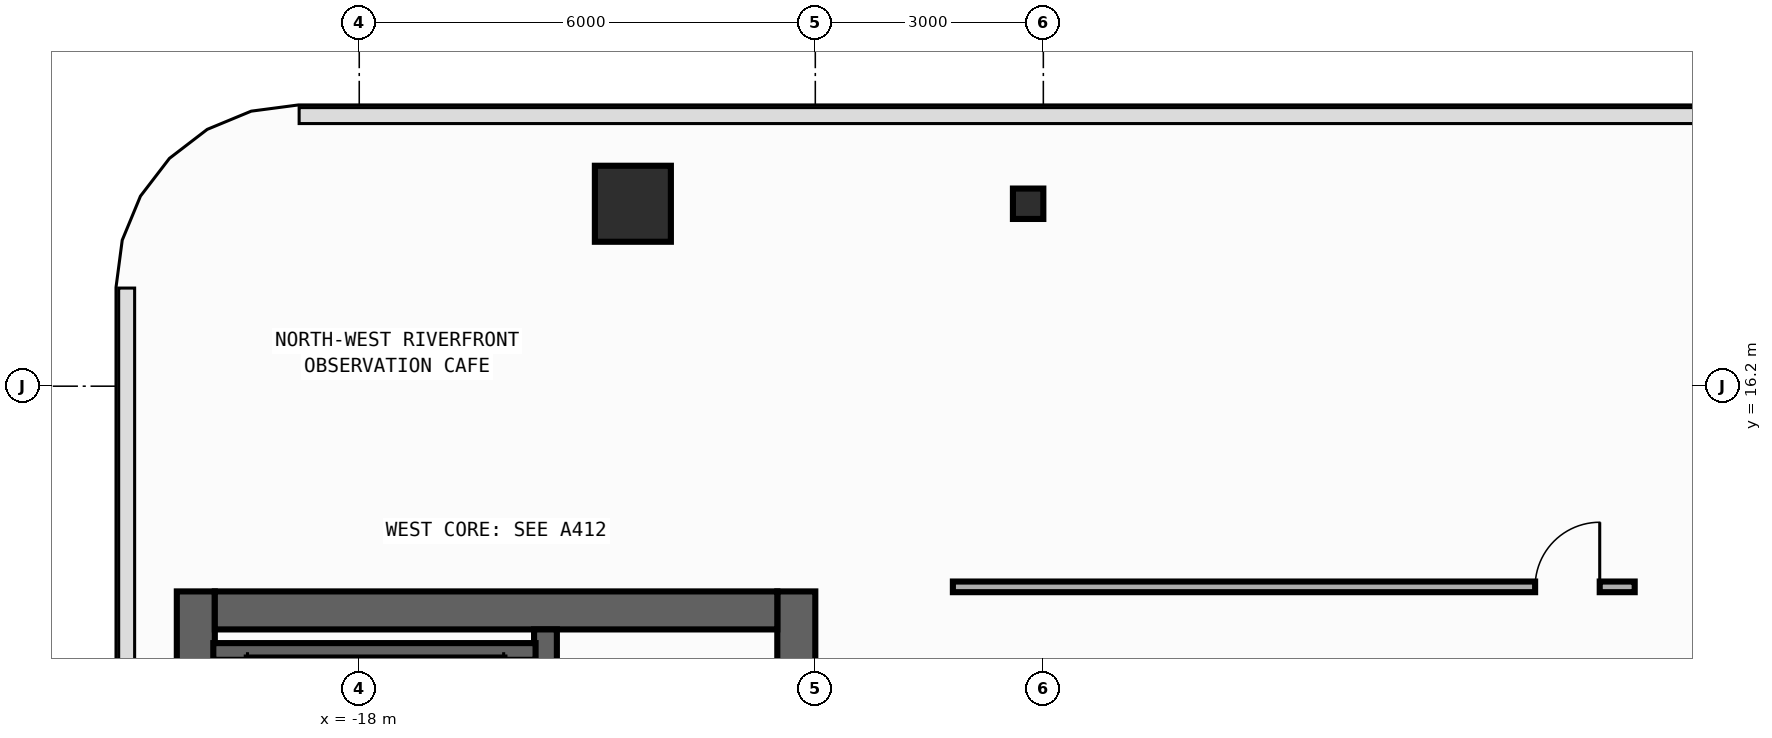
"""IFC4 building model, lengths in metres.
Left out: names, types, materials, properties, quantities, classifications, styles, units other than length and angle.
Written with IfcOpenShell. Run it as: python <this file> out.ifc"""

import sys

from ifc_helpers import new_model, si_unit, direction, frame, frame_2d, origin, origin_2d, place, context, subcontext, project, spatial, rectangle, circle, i_section, extrude, element, fill, save


model = new_model("IFC4")
c1 = context("Model", 3, precision=1e-05, world=origin(), true_north=direction((0.0, 1.0)))
c2 = subcontext(c1, "Body", "Model", "MODEL_VIEW")
j1 = project(units=[si_unit("LENGTHUNIT", "METRE"), si_unit("PLANEANGLEUNIT", "RADIAN")], contexts=[c1])
p1 = place(None, origin())
s1 = spatial("IfcSite", under=j1, at=p1, CompositionType="ELEMENT")
p2 = place(p1, origin())
s2 = spatial("IfcBuilding", under=s1, at=p2, CompositionType="ELEMENT")
p3 = place(p2, frame((0.0, 0.0, 320.4)))
s3 = spatial("IfcBuildingStorey", under=s2, at=p3, CompositionType="ELEMENT", Elevation=320.4)
p4 = place(p3, frame((-20.15, -13.5, 0.0), z_axis=(0.0, 0.0, 1.0), x_axis=(0.0, 1.0, 0.0)))
e1 = element("IfcWall", 1, at=p4, inside=s3, PredefinedType="SHEAR", context=c2, shape_type="SweptSolid", body=[
    extrude(rectangle(XDim=27.0, YDim=0.5, at=frame_2d((13.5, 0.0))), origin(), (0.0, 0.0, 1.0), 4.45),
])
p5 = place(p3, frame((-12.25, -13.5, 0.0), z_axis=(0.0, 0.0, 1.0), x_axis=(0.0, 1.0, 0.0)))
e2 = element("IfcWall", 2, at=p5, inside=s3, PredefinedType="SHEAR", context=c2, shape_type="SweptSolid", body=[
    extrude(rectangle(XDim=27.0, YDim=0.5, at=frame_2d((13.5, 0.0))), origin(), (0.0, 0.0, 1.0), 4.45),
])
p6 = place(p5, frame((15.175, 0.0, 0.0)))
e3 = element("IfcOpeningElement", 3, at=p6, cuts=e2, PredefinedType="OPENING", context=c2, shape_type="SweptSolid", body=[
    extrude(rectangle(XDim=0.85, YDim=2.1, at=frame_2d((0.425, 1.05))), frame((0.0, 0.26, 0.0), z_axis=(0.0, -1.0, 0.0), x_axis=(1.0, 0.0, 0.0)), (0.0, 0.0, 1.0), 0.52),
])
p7 = place(p5, frame((21.275, 0.0, 0.0)))
e4 = element("IfcOpeningElement", 4, at=p7, cuts=e2, PredefinedType="OPENING", context=c2, shape_type="SweptSolid", body=[
    extrude(rectangle(XDim=0.85, YDim=2.1, at=frame_2d((0.425, 1.05))), frame((0.0, 0.26, 0.0), z_axis=(0.0, -1.0, 0.0), x_axis=(1.0, 0.0, 0.0)), (0.0, 0.0, 1.0), 0.52),
])
p8 = place(p5, frame((4.275, 0.0, 0.0)))
e5 = element("IfcOpeningElement", 5, at=p8, cuts=e2, PredefinedType="OPENING", context=c2, shape_type="SweptSolid", body=[
    extrude(rectangle(XDim=0.85, YDim=2.1, at=frame_2d((0.425, 1.05))), frame((0.0, 0.26, 0.0), z_axis=(0.0, -1.0, 0.0), x_axis=(1.0, 0.0, 0.0)), (0.0, 0.0, 1.0), 0.52),
])
p9 = place(p5, frame((10.275, 0.0, 0.0)))
e6 = element("IfcOpeningElement", 6, at=p9, cuts=e2, PredefinedType="OPENING", context=c2, shape_type="SweptSolid", body=[
    extrude(rectangle(XDim=0.85, YDim=2.1, at=frame_2d((0.425, 1.05))), frame((0.0, 0.26, 0.0), z_axis=(0.0, -1.0, 0.0), x_axis=(1.0, 0.0, 0.0)), (0.0, 0.0, 1.0), 0.52),
])
p10 = place(p5, frame((12.725, 0.0, 0.0)))
e7 = element("IfcOpeningElement", 7, at=p10, cuts=e2, PredefinedType="OPENING", context=c2, shape_type="SweptSolid", body=[
    extrude(rectangle(XDim=1.15, YDim=2.2, at=frame_2d((0.575, 1.1))), frame((0.0, 0.26, 0.0), z_axis=(0.0, -1.0, 0.0), x_axis=(1.0, 0.0, 0.0)), (0.0, 0.0, 1.0), 0.52),
])
p11 = place(p5, frame((1.625, 0.0, 0.0)))
e8 = element("IfcOpeningElement", 8, at=p11, cuts=e2, PredefinedType="OPENING", context=c2, shape_type="SweptSolid", body=[
    extrude(rectangle(XDim=0.85, YDim=2.1, at=frame_2d((0.425, 1.05))), frame((0.0, 0.26, 0.0), z_axis=(0.0, -1.0, 0.0), x_axis=(1.0, 0.0, 0.0)), (0.0, 0.0, 1.0), 0.52),
])
p12 = place(p3, frame((-19.9, 13.25, 0.0), z_axis=(0.0, 0.0, 1.0), x_axis=(1.0, 0.0, 0.0)))
e9 = element("IfcWall", 9, at=p12, inside=s3, PredefinedType="SHEAR", context=c2, shape_type="SweptSolid", body=[
    extrude(rectangle(XDim=7.4, YDim=0.5, at=frame_2d((3.7, 0.0))), origin(), (0.0, 0.0, 1.0), 4.45),
])
p13 = place(p3, frame((-15.55, -13.0, 0.0), z_axis=(0.0, 0.0, 1.0), x_axis=(0.0, 1.0, 0.0)))
e10 = element("IfcWall", 10, at=p13, inside=s3, PredefinedType="SHEAR", context=c2, shape_type="SweptSolid", body=[
    extrude(rectangle(XDim=26.0, YDim=0.3, at=frame_2d((13.0, 0.0))), origin(), (0.0, 0.0, 1.0), 4.45),
])
p14 = place(p13, frame((12.225, 0.0, 0.0)))
e11 = element("IfcOpeningElement", 11, at=p14, cuts=e10, PredefinedType="OPENING", context=c2, shape_type="SweptSolid", body=[
    extrude(rectangle(XDim=1.15, YDim=2.2, at=frame_2d((0.575, 1.1))), frame((0.0, 0.16, 0.0), z_axis=(0.0, -1.0, 0.0), x_axis=(1.0, 0.0, 0.0)), (0.0, 0.0, 1.0), 0.32),
])
p15 = place(p13, frame((1.125, 0.0, 0.0)))
e12 = element("IfcOpeningElement", 12, at=p15, cuts=e10, PredefinedType="OPENING", context=c2, shape_type="SweptSolid", body=[
    extrude(rectangle(XDim=0.85, YDim=2.1, at=frame_2d((0.425, 1.05))), frame((0.0, 0.16, 0.0), z_axis=(0.0, -1.0, 0.0), x_axis=(1.0, 0.0, 0.0)), (0.0, 0.0, 1.0), 0.32),
])
for number, where, z_axis, x_axis in (
    (13, (-16.04, 1.29, 0.0), (0.0, 0.0, 1.0), (0.0, 1.0, 0.0)),
    (14, (-19.53, 1.29, 0.0), (0.0, 0.0, 1.0), (0.0, 1.0, 0.0)),
):
    element("IfcWall", number, at=place(p3, frame(where, z_axis=z_axis, x_axis=x_axis)), inside=s3, PredefinedType="SHEAR", context=c2, shape_type="SweptSolid", body=[
        extrude(rectangle(XDim=11.42, YDim=0.22, at=frame_2d((5.71, 0.0))), origin(), (0.0, 0.0, 1.0), 4.45),
    ])
p16 = place(p3, frame((-19.92, 12.71, 0.0), z_axis=(0.0, 0.0, 1.0), x_axis=(1.0, 0.0, 0.0)))
e15 = element("IfcWall", 15, at=p16, inside=s3, PredefinedType="SHEAR", context=c2, shape_type="SweptSolid", body=[
    extrude(rectangle(XDim=4.24, YDim=0.22, at=frame_2d((2.12, 0.0))), origin(), (0.0, 0.0, 1.0), 4.45),
])
p17 = place(p3, frame((-9.2, 18.6, 0.0), z_axis=(0.0, 0.0, 1.0), x_axis=(1.0, 0.0, 0.0)))
e16 = element("IfcColumn", 16, at=p17, inside=s3, PredefinedType="COLUMN", context=c2, shape_type="SweptSolid", body=[
    extrude(i_section(OverallWidth=0.4, OverallDepth=0.4, WebThickness=0.013, FlangeThickness=0.021, FilletRadius=0.022, at=origin_2d()), origin(), (0.0, 0.0, 1.0), 4.8),
])
p18 = place(p3, frame((-14.4, 18.6, 0.0), z_axis=(0.0, 0.0, 1.0), x_axis=(1.0, 0.0, 0.0)))
e17 = element("IfcColumn", 17, at=p18, inside=s3, PredefinedType="COLUMN", context=c2, shape_type="SweptSolid", body=[
    extrude(circle(Radius=0.5, at=origin_2d()), origin(), (0.0, 0.0, 1.0), 4.8),
])
p19 = place(p3, frame((-10.19, 13.56, 0.0), z_axis=(0.0, 0.0, 1.0), x_axis=(1.0, 0.0, 0.0)))
e18 = element("IfcWall", 18, at=p19, inside=s3, PredefinedType="PARTITIONING", context=c2, shape_type="SweptSolid", body=[
    extrude(rectangle(XDim=8.97, YDim=0.14, at=frame_2d((4.485, 0.0))), origin(), (0.0, 0.0, 1.0), 4.45),
])
p20 = place(p19, frame((7.66, 0.0, 0.0)))
e19 = element("IfcOpeningElement", 19, at=p20, cuts=e18, PredefinedType="OPENING", context=c2, shape_type="SweptSolid", body=[
    extrude(rectangle(XDim=0.85, YDim=2.1, at=frame_2d((0.425, 1.05))), frame((0.0, 0.08, 0.0), z_axis=(0.0, -1.0, 0.0), x_axis=(1.0, 0.0, 0.0)), (0.0, 0.0, 1.0), 0.16),
])
p21 = place(p20, origin())
e20 = element("IfcDoor", 20, at=p21, inside=s3, OperationType="SINGLE_SWING_RIGHT", PredefinedType="DOOR", context=c2, shape_type="SweptSolid", body=[
    extrude(rectangle(XDim=0.85, YDim=2.1, at=frame_2d((0.425, 1.05))), frame((0.0, 0.025, 0.0), z_axis=(0.0, -1.0, 0.0), x_axis=(1.0, 0.0, 0.0)), (0.0, 0.0, 1.0), 0.05),
])
fill(e19, e20)
save(model, sys.argv[1])
